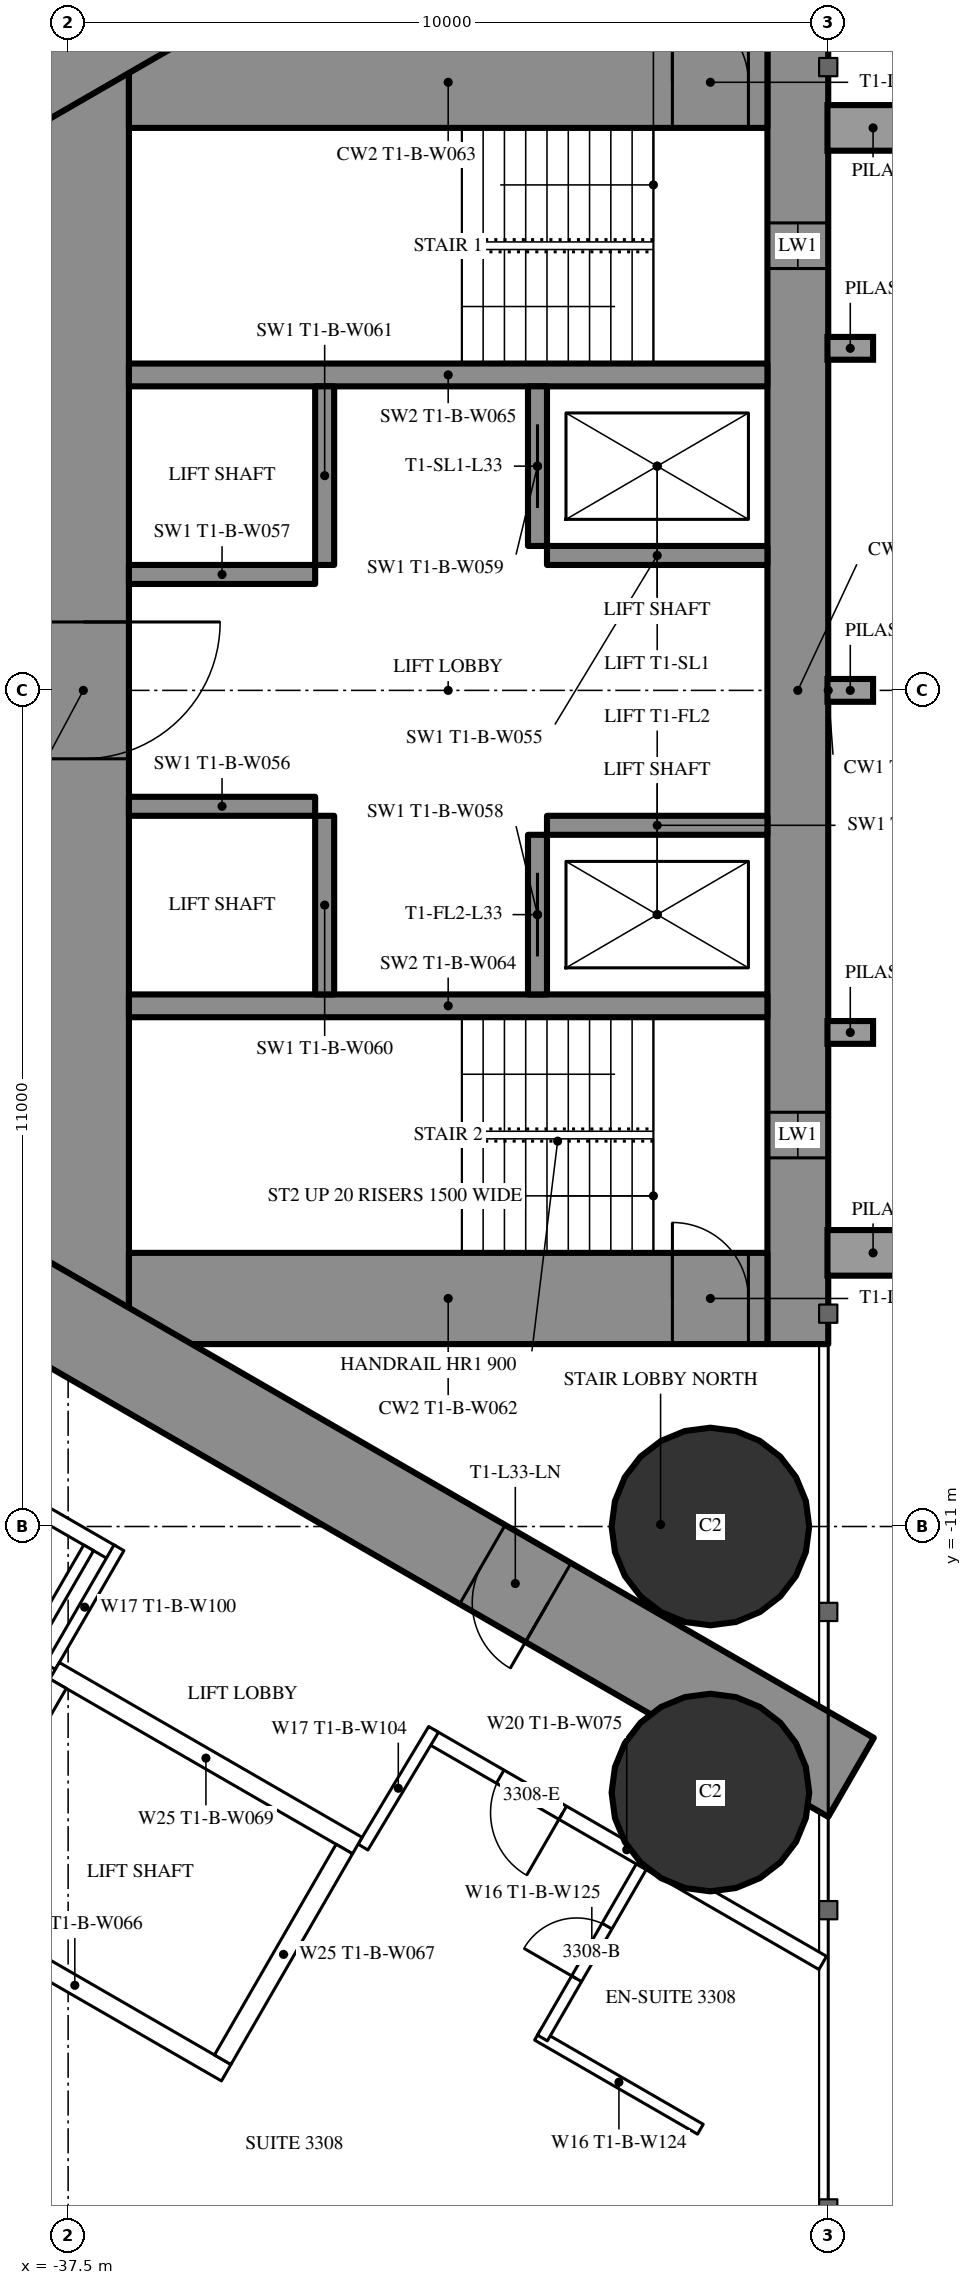
"""IFC4 building model, lengths in metres.
Left out: names, types, materials, properties, quantities, classifications, styles, units other than length and angle.
Written with IfcOpenShell. Run it as: python <this file> out.ifc"""

import sys

from ifc_helpers import new_model, si_unit, direction, frame, frame_2d, origin, origin_2d, place, context, subcontext, project, spatial, rectangle, hollow_circle, extrude, element, fill, save


model = new_model("IFC4")
c1 = context("Model", 3, precision=1e-05, world=origin(), true_north=direction((0.0, 1.0)))
c2 = subcontext(c1, "Body", "Model", "MODEL_VIEW")
j1 = project(units=[si_unit("LENGTHUNIT", "METRE"), si_unit("PLANEANGLEUNIT", "RADIAN")], contexts=[c1])
p1 = place(None, origin())
s1 = spatial("IfcSite", under=j1, at=p1, CompositionType="ELEMENT")
p2 = place(p1, origin())
s2 = spatial("IfcBuilding", under=s1, at=p2, CompositionType="ELEMENT")
p3 = place(p2, frame((0.0, 0.0, 125.6)))
s3 = spatial("IfcBuildingStorey", under=s2, at=p3, CompositionType="ELEMENT", Elevation=125.6)
for number, where, z_axis, x_axis in (
    (1, (-29.05, -11.0, 0.0), (0.0, 0.0, 1.0), (1.0, 0.0, 0.0)),
    (2, (-29.05, -14.5, 0.0), (0.0, 0.0, 1.0), (1.0, 0.0, 0.0)),
):
    element("IfcColumn", number, at=place(p3, frame(where, z_axis=z_axis, x_axis=x_axis)), inside=s3, PredefinedType="COLUMN", context=c2, shape_type="SweptSolid", body=[
        extrude(hollow_circle(Radius=1.3, WallThickness=0.1, at=origin_2d()), origin(), (0.0, 0.0, 1.0), 3.5),
    ])
p4 = place(p3, frame((-27.9, 8.6, 0.0), z_axis=(0.0, 0.0, 1.0), x_axis=(0.0, -1.0, 0.0)))
e3 = element("IfcWall", 3, at=p4, inside=s3, PredefinedType="SHEAR", context=c2, shape_type="SweptSolid", body=[
    extrude(rectangle(XDim=17.2, YDim=0.8, at=frame_2d((8.6, 0.0))), origin(), (0.0, 0.0, 1.0), 3.5),
])
p5 = place(p4, frame((2.45, 0.0, 0.6)))
e4 = element("IfcOpeningElement", 4, at=p5, cuts=e3, PredefinedType="OPENING", context=c2, shape_type="SweptSolid", body=[
    extrude(rectangle(XDim=0.6, YDim=2.1, at=frame_2d((0.3, 1.05))), frame((0.0, 0.41, 0.0), z_axis=(0.0, -1.0, 0.0), x_axis=(1.0, 0.0, 0.0)), (0.0, 0.0, 1.0), 0.82),
])
p6 = place(p4, frame((14.15, 0.0, 0.6)))
e5 = element("IfcOpeningElement", 5, at=p6, cuts=e3, PredefinedType="OPENING", context=c2, shape_type="SweptSolid", body=[
    extrude(rectangle(XDim=0.6, YDim=2.1, at=frame_2d((0.3, 1.05))), frame((0.0, 0.41, 0.0), z_axis=(0.0, -1.0, 0.0), x_axis=(1.0, 0.0, 0.0)), (0.0, 0.0, 1.0), 0.82),
])
p7 = place(p3, frame((-37.3, 8.6, 0.0), z_axis=(0.0, 0.0, 1.0), x_axis=(0.0, -1.0, 0.0)))
e6 = element("IfcWall", 6, at=p7, inside=s3, PredefinedType="SHEAR", context=c2, shape_type="SweptSolid", body=[
    extrude(rectangle(XDim=17.2, YDim=1.2, at=frame_2d((8.6, 0.0))), origin(), (0.0, 0.0, 1.0), 3.5),
])
p8 = place(p7, frame((7.7, 0.0, 0.0)))
e7 = element("IfcOpeningElement", 7, at=p8, cuts=e6, PredefinedType="OPENING", context=c2, shape_type="SweptSolid", body=[
    extrude(rectangle(XDim=1.8, YDim=2.2, at=frame_2d((0.9, 1.1))), frame((0.0, 0.61, 0.0), z_axis=(0.0, -1.0, 0.0), x_axis=(1.0, 0.0, 0.0)), (0.0, 0.0, 1.0), 1.22),
])
p9 = place(p3, frame((-28.3, 8.0, 0.0), z_axis=(0.0, 0.0, 1.0), x_axis=(-1.0, 0.0, 0.0)))
e8 = element("IfcWall", 8, at=p9, inside=s3, PredefinedType="SHEAR", context=c2, shape_type="SweptSolid", body=[
    extrude(rectangle(XDim=8.4, YDim=1.2, at=frame_2d((4.2, 0.0))), origin(), (0.0, 0.0, 1.0), 3.5),
])
p10 = place(p9, frame((0.25, 0.0, 0.0)))
e9 = element("IfcOpeningElement", 9, at=p10, cuts=e8, PredefinedType="OPENING", context=c2, shape_type="SweptSolid", body=[
    extrude(rectangle(XDim=1.0, YDim=2.2, at=frame_2d((0.5, 1.1))), frame((0.0, 0.61, 0.0), z_axis=(0.0, -1.0, 0.0), x_axis=(1.0, 0.0, 0.0)), (0.0, 0.0, 1.0), 1.22),
])
p11 = place(p3, frame((-28.3, -8.0, 0.0), z_axis=(0.0, 0.0, 1.0), x_axis=(-1.0, 0.0, 0.0)))
e10 = element("IfcWall", 10, at=p11, inside=s3, PredefinedType="SHEAR", context=c2, shape_type="SweptSolid", body=[
    extrude(rectangle(XDim=8.4, YDim=1.2, at=frame_2d((4.2, 0.0))), origin(), (0.0, 0.0, 1.0), 3.5),
])
p12 = place(p11, frame((0.25, 0.0, 0.0)))
e11 = element("IfcOpeningElement", 11, at=p12, cuts=e10, PredefinedType="OPENING", context=c2, shape_type="SweptSolid", body=[
    extrude(rectangle(XDim=1.0, YDim=2.2, at=frame_2d((0.5, 1.1))), frame((0.0, 0.61, 0.0), z_axis=(0.0, -1.0, 0.0), x_axis=(1.0, 0.0, 0.0)), (0.0, 0.0, 1.0), 1.22),
])
for number, where, z_axis, x_axis in (
    (12, (-28.3, 4.15, 0.0), (0.0, 0.0, 1.0), (-1.0, 0.0, 0.0)),
    (13, (-28.3, -4.15, 0.0), (0.0, 0.0, 1.0), (-1.0, 0.0, 0.0)),
):
    element("IfcWall", number, at=place(p3, frame(where, z_axis=z_axis, x_axis=x_axis)), inside=s3, PredefinedType="SHEAR", context=c2, shape_type="SweptSolid", body=[
        extrude(rectangle(XDim=8.4, YDim=0.3, at=frame_2d((4.2, 0.0))), origin(), (0.0, 0.0, 1.0), 3.5),
    ])
p13 = place(p3, frame((-31.325, 4.0, 0.0), z_axis=(0.0, 0.0, 1.0), x_axis=(0.0, -1.0, 0.0)))
e14 = element("IfcWall", 14, at=p13, inside=s3, PredefinedType="SHEAR", context=c2, shape_type="SweptSolid", body=[
    extrude(rectangle(XDim=2.1, YDim=0.25, at=frame_2d((1.05, 0.0))), origin(), (0.0, 0.0, 1.0), 3.5),
])
p14 = place(p13, frame((0.5, 0.0, 0.0)))
e15 = element("IfcOpeningElement", 15, at=p14, cuts=e14, PredefinedType="OPENING", context=c2, shape_type="SweptSolid", body=[
    extrude(rectangle(XDim=1.1, YDim=2.2, at=frame_2d((0.55, 1.1))), frame((0.0, 0.135, 0.0), z_axis=(0.0, -1.0, 0.0), x_axis=(1.0, 0.0, 0.0)), (0.0, 0.0, 1.0), 0.27),
])
p15 = place(p3, frame((-34.125, 4.0, 0.0), z_axis=(0.0, 0.0, 1.0), x_axis=(0.0, -1.0, 0.0)))
e16 = element("IfcWall", 16, at=p15, inside=s3, PredefinedType="SHEAR", context=c2, shape_type="SweptSolid", body=[
    extrude(rectangle(XDim=2.35, YDim=0.25, at=frame_2d((1.175, 0.0))), origin(), (0.0, 0.0, 1.0), 3.5),
])
p16 = place(p3, frame((-28.3, 1.775, 0.0), z_axis=(0.0, 0.0, 1.0), x_axis=(-1.0, 0.0, 0.0)))
e17 = element("IfcWall", 17, at=p16, inside=s3, PredefinedType="SHEAR", context=c2, shape_type="SweptSolid", body=[
    extrude(rectangle(XDim=2.9, YDim=0.25, at=frame_2d((1.45, 0.0))), origin(), (0.0, 0.0, 1.0), 3.5),
])
p17 = place(p3, frame((-34.25, 1.525, 0.0), z_axis=(0.0, 0.0, 1.0), x_axis=(-1.0, 0.0, 0.0)))
e18 = element("IfcWall", 18, at=p17, inside=s3, PredefinedType="SHEAR", context=c2, shape_type="SweptSolid", body=[
    extrude(rectangle(XDim=2.45, YDim=0.25, at=frame_2d((1.225, 0.0))), origin(), (0.0, 0.0, 1.0), 3.5),
])
p18 = place(p3, frame((-31.325, -1.9, 0.0), z_axis=(0.0, 0.0, 1.0), x_axis=(0.0, -1.0, 0.0)))
e19 = element("IfcWall", 19, at=p18, inside=s3, PredefinedType="SHEAR", context=c2, shape_type="SweptSolid", body=[
    extrude(rectangle(XDim=2.1, YDim=0.25, at=frame_2d((1.05, 0.0))), origin(), (0.0, 0.0, 1.0), 3.5),
])
p19 = place(p18, frame((0.5, 0.0, 0.0)))
e20 = element("IfcOpeningElement", 20, at=p19, cuts=e19, PredefinedType="OPENING", context=c2, shape_type="SweptSolid", body=[
    extrude(rectangle(XDim=1.1, YDim=2.2, at=frame_2d((0.55, 1.1))), frame((0.0, 0.135, 0.0), z_axis=(0.0, -1.0, 0.0), x_axis=(1.0, 0.0, 0.0)), (0.0, 0.0, 1.0), 0.27),
])
p20 = place(p3, frame((-34.125, -1.65, 0.0), z_axis=(0.0, 0.0, 1.0), x_axis=(0.0, -1.0, 0.0)))
e21 = element("IfcWall", 21, at=p20, inside=s3, PredefinedType="SHEAR", context=c2, shape_type="SweptSolid", body=[
    extrude(rectangle(XDim=2.35, YDim=0.25, at=frame_2d((1.175, 0.0))), origin(), (0.0, 0.0, 1.0), 3.5),
])
p21 = place(p3, frame((-28.3, -1.775, 0.0), z_axis=(0.0, 0.0, 1.0), x_axis=(-1.0, 0.0, 0.0)))
e22 = element("IfcWall", 22, at=p21, inside=s3, PredefinedType="SHEAR", context=c2, shape_type="SweptSolid", body=[
    extrude(rectangle(XDim=2.9, YDim=0.25, at=frame_2d((1.45, 0.0))), origin(), (0.0, 0.0, 1.0), 3.5),
])
p22 = place(p3, frame((-34.25, -1.525, 0.0), z_axis=(0.0, 0.0, 1.0), x_axis=(-1.0, 0.0, 0.0)))
e23 = element("IfcWall", 23, at=p22, inside=s3, PredefinedType="SHEAR", context=c2, shape_type="SweptSolid", body=[
    extrude(rectangle(XDim=2.45, YDim=0.25, at=frame_2d((1.225, 0.0))), origin(), (0.0, 0.0, 1.0), 3.5),
])
p23 = place(p3, frame((-27.2, 14.3, 0.0), z_axis=(0.0, 0.0, 1.0), x_axis=(-0.866026593062, -0.499997940104, 0.0)))
e24 = element("IfcWall", 24, at=p23, inside=s3, PredefinedType="SHEAR", context=c2, shape_type="SweptSolid", body=[
    extrude(rectangle(XDim=28.946, YDim=1.2, at=frame_2d((14.473, 0.0))), origin(), (0.0, 0.0, 1.0), 3.5),
])
p24 = place(p23, frame((4.6, 0.0, 0.0)))
e25 = element("IfcOpeningElement", 25, at=p24, cuts=e24, PredefinedType="OPENING", context=c2, shape_type="SweptSolid", body=[
    extrude(rectangle(XDim=1.0, YDim=2.2, at=frame_2d((0.5, 1.1))), frame((0.0, 0.61, 0.0), z_axis=(0.0, -1.0, 0.0), x_axis=(1.0, 0.0, 0.0)), (0.0, 0.0, 1.0), 1.22),
])
p25 = place(p23, frame((13.395, 0.0, 0.0)))
e26 = element("IfcOpeningElement", 26, at=p25, cuts=e24, PredefinedType="OPENING", context=c2, shape_type="SweptSolid", body=[
    extrude(rectangle(XDim=1.8, YDim=2.2, at=frame_2d((0.9, 1.1))), frame((0.0, 0.61, 0.0), z_axis=(0.0, -1.0, 0.0), x_axis=(1.0, 0.0, 0.0)), (0.0, 0.0, 1.0), 1.22),
])
p26 = place(p3, frame((-27.2, -14.3, 0.0), z_axis=(0.0, 0.0, 1.0), x_axis=(-0.866024021859, 0.500002393557, 0.0)))
e27 = element("IfcWall", 27, at=p26, inside=s3, PredefinedType="SHEAR", context=c2, shape_type="SweptSolid", body=[
    extrude(rectangle(XDim=27.907, YDim=1.2, at=frame_2d((13.954, 0.0))), origin(), (0.0, 0.0, 1.0), 3.5),
])
p27 = place(p26, frame((4.6, 0.0, 0.0)))
e28 = element("IfcOpeningElement", 28, at=p27, cuts=e27, PredefinedType="OPENING", context=c2, shape_type="SweptSolid", body=[
    extrude(rectangle(XDim=1.0, YDim=2.2, at=frame_2d((0.5, 1.1))), frame((0.0, 0.61, 0.0), z_axis=(0.0, -1.0, 0.0), x_axis=(1.0, 0.0, 0.0)), (0.0, 0.0, 1.0), 1.22),
])
p28 = place(p26, frame((13.395, 0.0, 0.0)))
e29 = element("IfcOpeningElement", 29, at=p28, cuts=e27, PredefinedType="OPENING", context=c2, shape_type="SweptSolid", body=[
    extrude(rectangle(XDim=1.8, YDim=2.2, at=frame_2d((0.9, 1.1))), frame((0.0, 0.61, 0.0), z_axis=(0.0, -1.0, 0.0), x_axis=(1.0, 0.0, 0.0)), (0.0, 0.0, 1.0), 1.22),
])
p29 = place(p3, frame((-27.572, -16.741, 0.0), z_axis=(0.0, 0.0, 1.0), x_axis=(-0.866024464444, 0.500001626982, 0.0)))
e30 = element("IfcWall", 30, at=p29, inside=s3, PredefinedType="PARTITIONING", context=c2, shape_type="SweptSolid", body=[
    extrude(rectangle(XDim=5.955, YDim=0.2, at=frame_2d((2.978, 0.0))), origin(), (0.0, 0.0, 1.0), 3.25),
])
p30 = place(p29, frame((3.95, 0.0, 0.0)))
e31 = element("IfcOpeningElement", 31, at=p30, cuts=e30, PredefinedType="OPENING", context=c2, shape_type="SweptSolid", body=[
    extrude(rectangle(XDim=0.95, YDim=2.2, at=frame_2d((0.475, 1.1))), frame((0.0, 0.11, 0.0), z_axis=(0.0, -1.0, 0.0), x_axis=(1.0, 0.0, 0.0)), (0.0, 0.0, 1.0), 0.22),
])
p31 = place(p3, frame((-36.92, -11.344, 0.0), z_axis=(0.0, 0.0, 1.0), x_axis=(-0.866028313256, 0.499994960614, 0.0)))
e32 = element("IfcWall", 32, at=p31, inside=s3, PredefinedType="PARTITIONING", context=c2, shape_type="SweptSolid", body=[
    extrude(rectangle(XDim=22.568, YDim=0.2, at=frame_2d((11.284, 0.0))), origin(), (0.0, 0.0, 1.0), 3.25),
])
p32 = place(p31, frame((12.131, 0.0, 0.0)))
e33 = element("IfcOpeningElement", 33, at=p32, cuts=e32, PredefinedType="OPENING", context=c2, shape_type="SweptSolid", body=[
    extrude(rectangle(XDim=0.95, YDim=2.2, at=frame_2d((0.475, 1.1))), frame((0.0, 0.11, 0.0), z_axis=(0.0, -1.0, 0.0), x_axis=(1.0, 0.0, 0.0)), (0.0, 0.0, 1.0), 0.22),
])
p33 = place(p31, frame((3.35, 0.0, 0.0)))
e34 = element("IfcOpeningElement", 34, at=p33, cuts=e32, PredefinedType="OPENING", context=c2, shape_type="SweptSolid", body=[
    extrude(rectangle(XDim=1.0, YDim=2.2, at=frame_2d((0.5, 1.1))), frame((0.0, 0.11, 0.0), z_axis=(0.0, -1.0, 0.0), x_axis=(1.0, 0.0, 0.0)), (0.0, 0.0, 1.0), 0.22),
])
p34 = place(p3, frame((-36.831, -11.28, 0.0), z_axis=(0.0, 0.0, 1.0), x_axis=(-0.499937177781, -0.866061671171, 0.0)))
e35 = element("IfcWall", 35, at=p34, inside=s3, PredefinedType="PARTITIONING", context=c2, shape_type="SweptSolid", body=[
    extrude(rectangle(XDim=1.804, YDim=0.15, at=frame_2d((0.902, 0.0))), origin(), (0.0, 0.0, 1.0), 3.25),
])
p35 = place(p3, frame((-33.621, -15.218, 0.0), z_axis=(0.0, 0.0, 1.0), x_axis=(0.514336634837, 0.857588377991, 0.0)))
e36 = element("IfcWall", 36, at=p35, inside=s3, PredefinedType="PARTITIONING", context=c2, shape_type="SweptSolid", body=[
    extrude(rectangle(XDim=1.805, YDim=0.15, at=frame_2d((0.903, 0.0))), origin(), (0.0, 0.0, 1.0), 3.25),
])
p36 = place(p3, frame((-37.7, 10.894, 0.0), z_axis=(0.0, 0.0, 1.0), x_axis=(-0.866027551079, -0.499996280759, 0.0)))
e37 = element("IfcWall", 37, at=p36, inside=s3, PredefinedType="PARTITIONING", context=c2, shape_type="SweptSolid", body=[
    extrude(rectangle(XDim=10.831, YDim=0.2, at=frame_2d((5.415, 0.0))), origin(), (0.0, 0.0, 1.0), 3.25),
])
p37 = place(p36, frame((6.93, 0.0, 0.0)))
e38 = element("IfcOpeningElement", 38, at=p37, cuts=e37, PredefinedType="OPENING", context=c2, shape_type="SweptSolid", body=[
    extrude(rectangle(XDim=0.95, YDim=2.2, at=frame_2d((0.475, 1.1))), frame((0.0, 0.11, 0.0), z_axis=(0.0, -1.0, 0.0), x_axis=(1.0, 0.0, 0.0)), (0.0, 0.0, 1.0), 0.22),
])
p38 = place(p3, frame((-37.23, -11.281, 0.0), z_axis=(0.0, 0.0, 1.0), x_axis=(-0.500049511043, -0.865996816683, 0.0)))
e39 = element("IfcWall", 39, at=p38, inside=s3, PredefinedType="PARTITIONING", context=c2, shape_type="SweptSolid", body=[
    extrude(rectangle(XDim=2.8, YDim=0.15, at=frame_2d((1.4, 0.0))), origin(), (0.0, 0.0, 1.0), 3.25),
])
p39 = place(p3, frame((-29.182, -18.929, 0.0), z_axis=(0.0, 0.0, 1.0), x_axis=(-0.866006523861, 0.500032699561, 0.0)))
e40 = element("IfcWall", 40, at=p39, inside=s3, PredefinedType="PARTITIONING", context=c2, shape_type="SweptSolid", body=[
    extrude(rectangle(XDim=2.475, YDim=0.15, at=frame_2d((1.237, 0.0))), origin(), (0.0, 0.0, 1.0), 3.25),
])
p40 = place(p3, frame((-29.96, -15.478, 0.0), z_axis=(0.0, 0.0, 1.0), x_axis=(-0.500006934395, -0.866021400173, 0.0)))
e41 = element("IfcWall", 41, at=p40, inside=s3, PredefinedType="PARTITIONING", context=c2, shape_type="SweptSolid", body=[
    extrude(rectangle(XDim=2.6, YDim=0.15, at=frame_2d((1.3, 0.0))), origin(), (0.0, 0.0, 1.0), 3.25),
])
p41 = place(p40, frame((0.9, 0.0, 0.0)))
e42 = element("IfcOpeningElement", 42, at=p41, cuts=e41, PredefinedType="OPENING", context=c2, shape_type="SweptSolid", body=[
    extrude(rectangle(XDim=0.8, YDim=2.2, at=frame_2d((0.4, 1.1))), frame((0.0, 0.085, 0.0), z_axis=(0.0, -1.0, 0.0), x_axis=(1.0, 0.0, 0.0)), (0.0, 0.0, 1.0), 0.17),
])
p42 = place(p3, frame((-33.696, -15.197, 0.0), z_axis=(0.0, 0.0, 1.0), x_axis=(-0.865976953817, 0.500083908417, 0.0)))
e43 = element("IfcWall", 43, at=p42, inside=s3, PredefinedType="PARTITIONING", context=c2, shape_type="SweptSolid", body=[
    extrude(rectangle(XDim=4.599, YDim=0.25, at=frame_2d((2.3, 0.0))), origin(), (0.0, 0.0, 1.0), 3.25),
])
p43 = place(p3, frame((-35.42, -18.186, 0.0), z_axis=(0.0, 0.0, 1.0), x_axis=(-0.865990227814, 0.50006092162, 0.0)))
e44 = element("IfcWall", 44, at=p43, inside=s3, PredefinedType="PARTITIONING", context=c2, shape_type="SweptSolid", body=[
    extrude(rectangle(XDim=4.6, YDim=0.25, at=frame_2d((2.3, 0.0))), origin(), (0.0, 0.0, 1.0), 3.25),
])
p44 = place(p3, frame((-33.866, -15.243, 0.0), z_axis=(0.0, 0.0, 1.0), x_axis=(-0.499929347863, -0.866066190972, 0.0)))
e45 = element("IfcWall", 45, at=p44, inside=s3, PredefinedType="PARTITIONING", context=c2, shape_type="SweptSolid", body=[
    extrude(rectangle(XDim=3.201, YDim=0.25, at=frame_2d((1.6, 0.0))), origin(), (0.0, 0.0, 1.0), 3.25),
])
p45 = place(p3, frame((-37.633, -13.068, 0.0), z_axis=(0.0, 0.0, 1.0), x_axis=(-0.499872130319, -0.866099216793, 0.0)))
e46 = element("IfcWall", 46, at=p45, inside=s3, PredefinedType="PARTITIONING", context=c2, shape_type="SweptSolid", body=[
    extrude(rectangle(XDim=3.2, YDim=0.25, at=frame_2d((1.6, 0.0))), origin(), (0.0, 0.0, 1.0), 3.25),
])
p46 = place(p41, origin())
e47 = element("IfcDoor", 47, at=p46, inside=s3, OperationType="SINGLE_SWING_RIGHT", PredefinedType="DOOR", context=c2, shape_type="SweptSolid", body=[
    extrude(rectangle(XDim=0.8, YDim=2.2, at=frame_2d((0.4, 1.1))), frame((0.0, 0.025, 0.0), z_axis=(0.0, -1.0, 0.0), x_axis=(1.0, 0.0, 0.0)), (0.0, 0.0, 1.0), 0.05),
])
fill(e42, e47)
p47 = place(p30, origin())
e48 = element("IfcDoor", 48, at=p47, inside=s3, OperationType="SINGLE_SWING_LEFT", PredefinedType="DOOR", context=c2, shape_type="SweptSolid", body=[
    extrude(rectangle(XDim=0.95, YDim=2.2, at=frame_2d((0.475, 1.1))), frame((0.0, 0.025, 0.0), z_axis=(0.0, -1.0, 0.0), x_axis=(1.0, 0.0, 0.0)), (0.0, 0.0, 1.0), 0.05),
])
fill(e31, e48)
p48 = place(p27, origin())
e49 = element("IfcDoor", 49, at=p48, inside=s3, OperationType="SINGLE_SWING_LEFT", PredefinedType="DOOR", context=c2, shape_type="SweptSolid", body=[
    extrude(rectangle(XDim=1.0, YDim=2.2, at=frame_2d((0.5, 1.1))), frame((0.0, 0.025, 0.0), z_axis=(0.0, -1.0, 0.0), x_axis=(1.0, 0.0, 0.0)), (0.0, 0.0, 1.0), 0.05),
])
fill(e28, e49)
p49 = place(p8, origin())
e50 = element("IfcDoor", 50, at=p49, inside=s3, OperationType="DOUBLE_DOOR_SINGLE_SWING", PredefinedType="DOOR", context=c2, shape_type="SweptSolid", body=[
    extrude(rectangle(XDim=1.8, YDim=2.2, at=frame_2d((0.9, 1.1))), frame((0.0, 0.025, 0.0), z_axis=(0.0, -1.0, 0.0), x_axis=(1.0, 0.0, 0.0)), (0.0, 0.0, 1.0), 0.05),
])
fill(e7, e50)
p50 = place(p10, origin())
e51 = element("IfcDoor", 51, at=p50, inside=s3, OperationType="SINGLE_SWING_RIGHT", PredefinedType="DOOR", context=c2, shape_type="SweptSolid", body=[
    extrude(rectangle(XDim=1.0, YDim=2.2, at=frame_2d((0.5, 1.1))), frame((0.0, 0.025, 0.0), z_axis=(0.0, -1.0, 0.0), x_axis=(1.0, 0.0, 0.0)), (0.0, 0.0, 1.0), 0.05),
])
fill(e9, e51)
p51 = place(p12, origin())
e52 = element("IfcDoor", 52, at=p51, inside=s3, OperationType="SINGLE_SWING_RIGHT", PredefinedType="DOOR", context=c2, shape_type="SweptSolid", body=[
    extrude(rectangle(XDim=1.0, YDim=2.2, at=frame_2d((0.5, 1.1))), frame((0.0, 0.025, 0.0), z_axis=(0.0, -1.0, 0.0), x_axis=(1.0, 0.0, 0.0)), (0.0, 0.0, 1.0), 0.05),
])
fill(e11, e52)
p52 = place(p14, origin())
e53 = element("IfcDoor", 53, at=p52, inside=s3, OperationType="SLIDING_TO_LEFT", PredefinedType="USERDEFINED", context=c2, shape_type="SweptSolid", body=[
    extrude(rectangle(XDim=1.1, YDim=2.2, at=frame_2d((0.55, 1.1))), frame((0.0, 0.025, 0.0), z_axis=(0.0, -1.0, 0.0), x_axis=(1.0, 0.0, 0.0)), (0.0, 0.0, 1.0), 0.05),
])
fill(e15, e53)
p53 = place(p19, origin())
e54 = element("IfcDoor", 54, at=p53, inside=s3, OperationType="SLIDING_TO_LEFT", PredefinedType="USERDEFINED", context=c2, shape_type="SweptSolid", body=[
    extrude(rectangle(XDim=1.1, YDim=2.2, at=frame_2d((0.55, 1.1))), frame((0.0, 0.025, 0.0), z_axis=(0.0, -1.0, 0.0), x_axis=(1.0, 0.0, 0.0)), (0.0, 0.0, 1.0), 0.05),
])
fill(e20, e54)
p54 = place(p5, origin())
e55 = element("IfcWindow", 55, at=p54, inside=s3, PartitioningType="SINGLE_PANEL", PredefinedType="WINDOW", context=c2, shape_type="SweptSolid", body=[
    extrude(rectangle(XDim=0.6, YDim=2.1, at=frame_2d((0.3, 1.05))), frame((0.0, 0.03, 0.0), z_axis=(0.0, -1.0, 0.0), x_axis=(1.0, 0.0, 0.0)), (0.0, 0.0, 1.0), 0.06),
])
fill(e4, e55)
p55 = place(p6, origin())
e56 = element("IfcWindow", 56, at=p55, inside=s3, PartitioningType="SINGLE_PANEL", PredefinedType="WINDOW", context=c2, shape_type="SweptSolid", body=[
    extrude(rectangle(XDim=0.6, YDim=2.1, at=frame_2d((0.3, 1.05))), frame((0.0, 0.03, 0.0), z_axis=(0.0, -1.0, 0.0), x_axis=(1.0, 0.0, 0.0)), (0.0, 0.0, 1.0), 0.06),
])
fill(e5, e56)
save(model, sys.argv[1])
